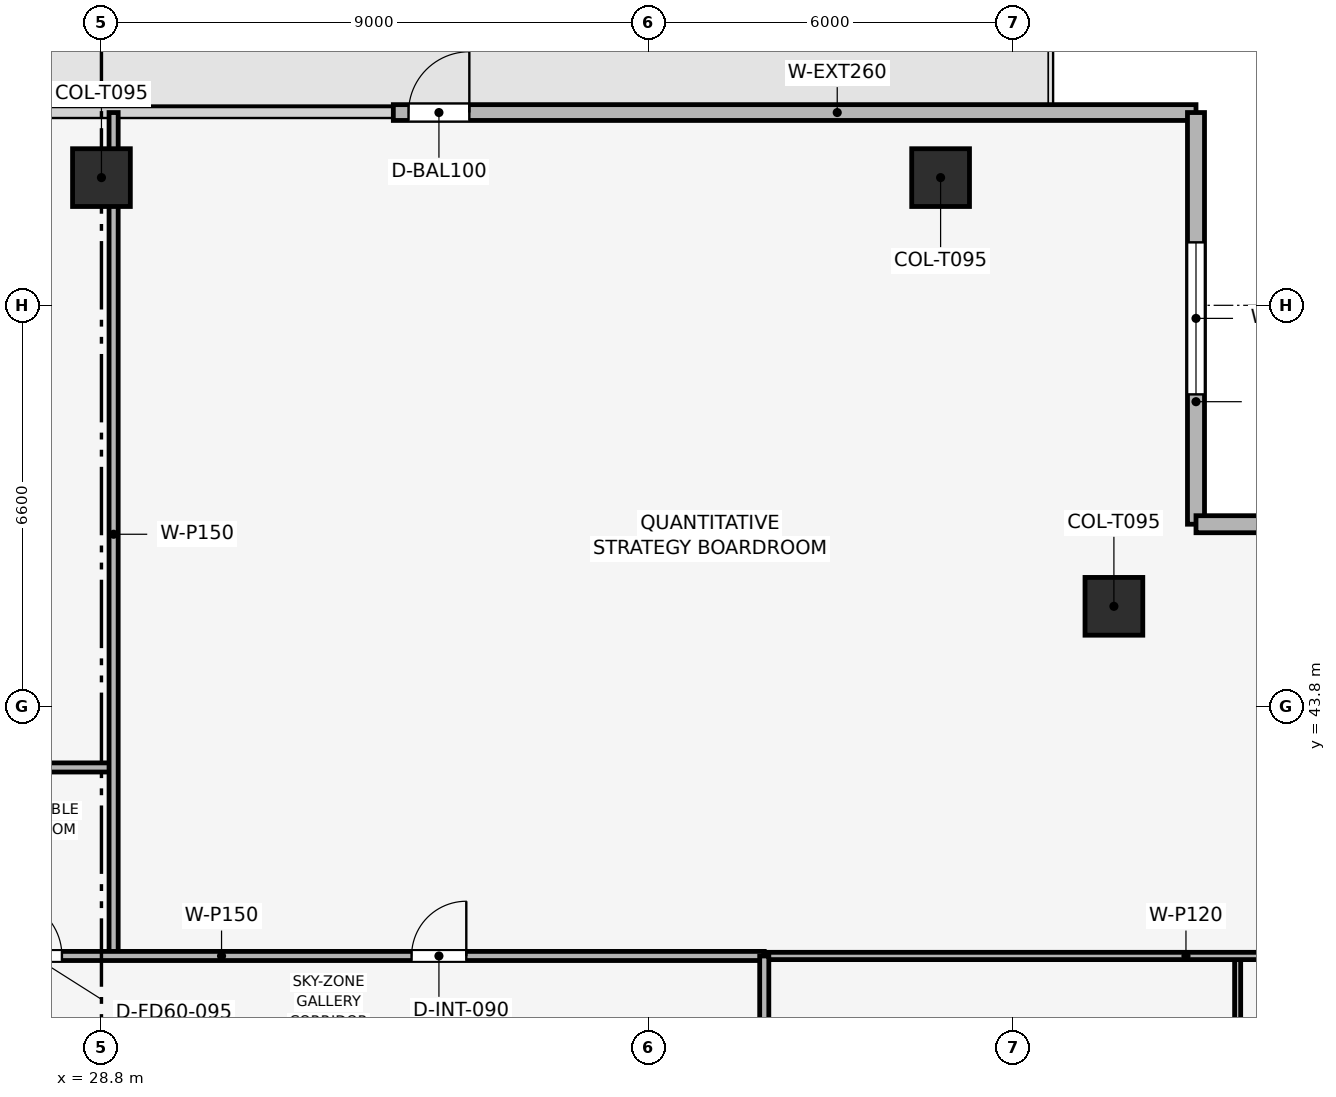
"""IFC4 building model, lengths in metres.
Left out: names, types, materials, properties, quantities, classifications, styles, units other than length and angle.
Written with IfcOpenShell. Run it as: python <this file> out.ifc"""

import sys

from ifc_helpers import new_model, si_unit, direction, frame, frame_2d, origin, origin_2d, place, context, subcontext, project, spatial, rectangle, extrude, element, fill, save


model = new_model("IFC4")
c1 = context("Model", 3, precision=1e-05, world=origin(), true_north=direction((0.0, 1.0)))
c2 = subcontext(c1, "Body", "Model", "MODEL_VIEW")
j1 = project(units=[si_unit("LENGTHUNIT", "METRE"), si_unit("PLANEANGLEUNIT", "RADIAN")], contexts=[c1])
p1 = place(None, origin())
s1 = spatial("IfcSite", under=j1, at=p1, CompositionType="ELEMENT")
p2 = place(p1, origin())
s2 = spatial("IfcBuilding", under=s1, at=p2, CompositionType="ELEMENT")
p3 = place(p2, frame((0.0, 0.0, 265.35)))
s3 = spatial("IfcBuildingStorey", under=s2, at=p3, CompositionType="ELEMENT", Elevation=265.35)
for number, where, z_axis, x_axis in (
    (1, (42.6, 52.5, 0.003), (0.0, 0.0, 1.0), (1.0, 0.0, 0.0)),
    (2, (28.8, 52.5, 0.003), (0.0, 0.0, 1.0), (1.0, 0.0, 0.0)),
    (3, (45.45, 45.45, 0.003), (0.0, 0.0, 1.0), (1.0, 0.0, 0.0)),
):
    element("IfcColumn", number, at=place(p3, frame(where, z_axis=z_axis, x_axis=x_axis)), inside=s3, PredefinedType="COLUMN", context=c2, shape_type="SweptSolid", body=[
        extrude(rectangle(XDim=0.95, YDim=0.95, at=origin_2d()), origin(), (0.0, 0.0, 1.0), 3.494),
    ])
p4 = place(p3, frame((33.6, 53.57, 0.0), z_axis=(0.0, 0.0, 1.0), x_axis=(1.0, 0.0, 0.0)))
e4 = element("IfcWall", 4, at=p4, inside=s3, PredefinedType="SOLIDWALL", context=c2, shape_type="SweptSolid", body=[
    extrude(rectangle(XDim=13.2, YDim=0.26, at=frame_2d((6.6, 0.0))), origin(), (0.0, 0.0, 1.0), 3.5),
])
p5 = place(p4, frame((0.25, 0.0, 0.0)))
e5 = element("IfcOpeningElement", 5, at=p5, cuts=e4, PredefinedType="OPENING", context=c2, shape_type="SweptSolid", body=[
    extrude(rectangle(XDim=1.0, YDim=2.2, at=frame_2d((0.5, 1.1))), frame((0.0, 0.14, 0.0), z_axis=(0.0, -1.0, 0.0), x_axis=(1.0, 0.0, 0.0)), (0.0, 0.0, 1.0), 0.28),
])
p6 = place(p3, frame((46.8, 53.57, 0.0), z_axis=(0.0, 0.0, 1.0), x_axis=(0.0, -1.0, 0.0)))
e6 = element("IfcWall", 6, at=p6, inside=s3, PredefinedType="SOLIDWALL", context=c2, shape_type="SweptSolid", body=[
    extrude(rectangle(XDim=6.77, YDim=0.28, at=frame_2d((3.385, 0.0))), origin(), (0.0, 0.0, 1.0), 3.5),
])
p7 = place(p6, frame((2.135, 0.0, 0.9)))
e7 = element("IfcOpeningElement", 7, at=p7, cuts=e6, PredefinedType="OPENING", context=c2, shape_type="SweptSolid", body=[
    extrude(rectangle(XDim=2.5, YDim=1.9, at=frame_2d((1.25, 0.95))), frame((0.0, 0.15, 0.0), z_axis=(0.0, -1.0, 0.0), x_axis=(1.0, 0.0, 0.0)), (0.0, 0.0, 1.0), 0.3),
])
p8 = place(p3, frame((46.8, 46.8, 0.0), z_axis=(0.0, 0.0, 1.0), x_axis=(1.0, 0.0, 0.0)))
e8 = element("IfcWall", 8, at=p8, inside=s3, PredefinedType="SOLIDWALL", context=c2, shape_type="SweptSolid", body=[
    extrude(rectangle(XDim=6.77, YDim=0.28, at=frame_2d((3.385, 0.0))), origin(), (0.0, 0.0, 1.0), 3.5),
])
p9 = place(p8, frame((2.135, 0.0, 0.9)))
e9 = element("IfcOpeningElement", 9, at=p9, cuts=e8, PredefinedType="OPENING", context=c2, shape_type="SweptSolid", body=[
    extrude(rectangle(XDim=2.5, YDim=1.9, at=frame_2d((1.25, 0.95))), frame((0.0, 0.15, 0.0), z_axis=(0.0, -1.0, 0.0), x_axis=(1.0, 0.0, 0.0)), (0.0, 0.0, 1.0), 0.3),
])
p10 = place(p3, frame((20.6, 42.8, 0.0), z_axis=(0.0, 0.0, 1.0), x_axis=(1.0, 0.0, 0.0)))
e10 = element("IfcWall", 10, at=p10, inside=s3, PredefinedType="PARTITIONING", context=c2, shape_type="SweptSolid", body=[
    extrude(rectangle(XDim=8.4, YDim=0.15, at=frame_2d((4.2, 0.0))), origin(), (0.0, 0.0, 1.0), 3.085),
])
p11 = place(p3, frame((29.0, 39.7, 0.0), z_axis=(0.0, 0.0, 1.0), x_axis=(0.0, 1.0, 0.0)))
e11 = element("IfcWall", 11, at=p11, inside=s3, PredefinedType="PARTITIONING", context=c2, shape_type="SweptSolid", body=[
    extrude(rectangle(XDim=13.87, YDim=0.15, at=frame_2d((6.935, 0.0))), origin(), (0.0, 0.0, 1.0), 2.985),
])
p12 = place(p3, frame((47.485, 31.282, 0.0), z_axis=(0.0, 0.0, 1.0), x_axis=(0.0, 1.0, 0.0)))
e12 = element("IfcWall", 12, at=p12, inside=s3, PredefinedType="MOVABLE", context=c2, shape_type="SweptSolid", body=[
    extrude(rectangle(XDim=8.418, YDim=0.1, at=frame_2d((4.209, 0.0))), origin(), (0.0, 0.0, 1.0), 3.085),
])
p13 = place(p12, frame((4.056, 0.0, 0.0)))
e13 = element("IfcOpeningElement", 13, at=p13, cuts=e12, PredefinedType="OPENING", context=c2, shape_type="SweptSolid", body=[
    extrude(rectangle(XDim=0.9, YDim=2.1, at=frame_2d((0.45, 1.05))), frame((0.0, 0.06, 0.0), z_axis=(0.0, -1.0, 0.0), x_axis=(1.0, 0.0, 0.0)), (0.0, 0.0, 1.0), 0.12),
])
p14 = place(p3, frame((39.7, 39.7, 0.0), z_axis=(0.0, 0.0, 1.0), x_axis=(1.0, 0.0, 0.0)))
e14 = element("IfcWall", 14, at=p14, inside=s3, PredefinedType="PARTITIONING", context=c2, shape_type="SweptSolid", body=[
    extrude(rectangle(XDim=13.87, YDim=0.12, at=frame_2d((6.935, 0.0))), origin(), (0.0, 0.0, 1.0), 3.085),
])
p15 = place(p3, frame((17.9, 39.7, 0.0), z_axis=(0.0, 0.0, 1.0), x_axis=(1.0, 0.0, 0.0)))
e15 = element("IfcWall", 15, at=p15, inside=s3, PredefinedType="PARTITIONING", context=c2, shape_type="SweptSolid", body=[
    extrude(rectangle(XDim=21.8, YDim=0.15, at=frame_2d((10.9, 0.0))), origin(), (0.0, 0.0, 1.0), 3.085),
])
p16 = place(p15, frame((0.9, 0.0, 0.0)))
e16 = element("IfcOpeningElement", 16, at=p16, cuts=e15, PredefinedType="OPENING", context=c2, shape_type="SweptSolid", body=[
    extrude(rectangle(XDim=0.9, YDim=2.1, at=frame_2d((0.45, 1.05))), frame((0.0, 0.085, 0.0), z_axis=(0.0, -1.0, 0.0), x_axis=(1.0, 0.0, 0.0)), (0.0, 0.0, 1.0), 0.17),
])
p17 = place(p15, frame((3.65, 0.0, 0.0)))
e17 = element("IfcOpeningElement", 17, at=p17, cuts=e15, PredefinedType="OPENING", context=c2, shape_type="SweptSolid", body=[
    extrude(rectangle(XDim=0.9, YDim=2.1, at=frame_2d((0.45, 1.05))), frame((0.0, 0.085, 0.0), z_axis=(0.0, -1.0, 0.0), x_axis=(1.0, 0.0, 0.0)), (0.0, 0.0, 1.0), 0.17),
])
p18 = place(p15, frame((6.55, 0.0, 0.0)))
e18 = element("IfcOpeningElement", 18, at=p18, cuts=e15, PredefinedType="OPENING", context=c2, shape_type="SweptSolid", body=[
    extrude(rectangle(XDim=0.9, YDim=2.1, at=frame_2d((0.45, 1.05))), frame((0.0, 0.085, 0.0), z_axis=(0.0, -1.0, 0.0), x_axis=(1.0, 0.0, 0.0)), (0.0, 0.0, 1.0), 0.17),
])
p19 = place(p15, frame((9.3, 0.0, 0.0)))
e19 = element("IfcOpeningElement", 19, at=p19, cuts=e15, PredefinedType="OPENING", context=c2, shape_type="SweptSolid", body=[
    extrude(rectangle(XDim=0.95, YDim=2.1, at=frame_2d((0.475, 1.05))), frame((0.0, 0.085, 0.0), z_axis=(0.0, -1.0, 0.0), x_axis=(1.0, 0.0, 0.0)), (0.0, 0.0, 1.0), 0.17),
])
p20 = place(p15, frame((16.0, 0.0, 0.0)))
e20 = element("IfcOpeningElement", 20, at=p20, cuts=e15, PredefinedType="OPENING", context=c2, shape_type="SweptSolid", body=[
    extrude(rectangle(XDim=0.9, YDim=2.1, at=frame_2d((0.45, 1.05))), frame((0.0, 0.085, 0.0), z_axis=(0.0, -1.0, 0.0), x_axis=(1.0, 0.0, 0.0)), (0.0, 0.0, 1.0), 0.17),
])
p21 = place(p3, frame((39.7, 24.4, 0.0), z_axis=(0.0, 0.0, 1.0), x_axis=(0.0, 1.0, 0.0)))
e21 = element("IfcWall", 21, at=p21, inside=s3, PredefinedType="PARTITIONING", context=c2, shape_type="SweptSolid", body=[
    extrude(rectangle(XDim=15.3, YDim=0.15, at=frame_2d((7.65, 0.0))), origin(), (0.0, 0.0, 1.0), 3.085),
])
p22 = place(p21, frame((0.7, 0.0, 0.0)))
e22 = element("IfcOpeningElement", 22, at=p22, cuts=e21, PredefinedType="OPENING", context=c2, shape_type="SweptSolid", body=[
    extrude(rectangle(XDim=0.9, YDim=2.1, at=frame_2d((0.45, 1.05))), frame((0.0, 0.085, 0.0), z_axis=(0.0, -1.0, 0.0), x_axis=(1.0, 0.0, 0.0)), (0.0, 0.0, 1.0), 0.17),
])
p23 = place(p21, frame((4.141, 0.0, 0.0)))
e23 = element("IfcOpeningElement", 23, at=p23, cuts=e21, PredefinedType="OPENING", context=c2, shape_type="SweptSolid", body=[
    extrude(rectangle(XDim=0.9, YDim=2.1, at=frame_2d((0.45, 1.05))), frame((0.0, 0.085, 0.0), z_axis=(0.0, -1.0, 0.0), x_axis=(1.0, 0.0, 0.0)), (0.0, 0.0, 1.0), 0.17),
])
p24 = place(p21, frame((10.641, 0.0, 0.0)))
e24 = element("IfcOpeningElement", 24, at=p24, cuts=e21, PredefinedType="OPENING", context=c2, shape_type="SweptSolid", body=[
    extrude(rectangle(XDim=0.9, YDim=2.1, at=frame_2d((0.45, 1.05))), frame((0.0, 0.085, 0.0), z_axis=(0.0, -1.0, 0.0), x_axis=(1.0, 0.0, 0.0)), (0.0, 0.0, 1.0), 0.17),
])
p25 = place(p5, origin())
e25 = element("IfcDoor", 25, at=p25, inside=s3, OperationType="SINGLE_SWING_RIGHT", PredefinedType="DOOR", context=c2, shape_type="SweptSolid", body=[
    extrude(rectangle(XDim=1.0, YDim=2.2, at=frame_2d((0.5, 1.1))), frame((0.0, 0.025, 0.0), z_axis=(0.0, -1.0, 0.0), x_axis=(1.0, 0.0, 0.0)), (0.0, 0.0, 1.0), 0.05),
])
fill(e5, e25)
p26 = place(p7, origin())
e26 = element("IfcWindow", 26, at=p26, inside=s3, PartitioningType="SINGLE_PANEL", PredefinedType="WINDOW", context=c2, shape_type="SweptSolid", body=[
    extrude(rectangle(XDim=2.5, YDim=1.9, at=frame_2d((1.25, 0.95))), frame((0.0, 0.03, 0.0), z_axis=(0.0, -1.0, 0.0), x_axis=(1.0, 0.0, 0.0)), (0.0, 0.0, 1.0), 0.06),
])
fill(e7, e26)
p27 = place(p19, origin())
e27 = element("IfcDoor", 27, at=p27, inside=s3, OperationType="SINGLE_SWING_LEFT", PredefinedType="DOOR", context=c2, shape_type="SweptSolid", body=[
    extrude(rectangle(XDim=0.95, YDim=2.1, at=frame_2d((0.475, 1.05))), frame((0.0, 0.025, 0.0), z_axis=(0.0, -1.0, 0.0), x_axis=(1.0, 0.0, 0.0)), (0.0, 0.0, 1.0), 0.05),
])
fill(e19, e27)
p28 = place(p20, origin())
e28 = element("IfcDoor", 28, at=p28, inside=s3, OperationType="SINGLE_SWING_RIGHT", PredefinedType="DOOR", context=c2, shape_type="SweptSolid", body=[
    extrude(rectangle(XDim=0.9, YDim=2.1, at=frame_2d((0.45, 1.05))), frame((0.0, 0.025, 0.0), z_axis=(0.0, -1.0, 0.0), x_axis=(1.0, 0.0, 0.0)), (0.0, 0.0, 1.0), 0.05),
])
fill(e20, e28)
save(model, sys.argv[1])
